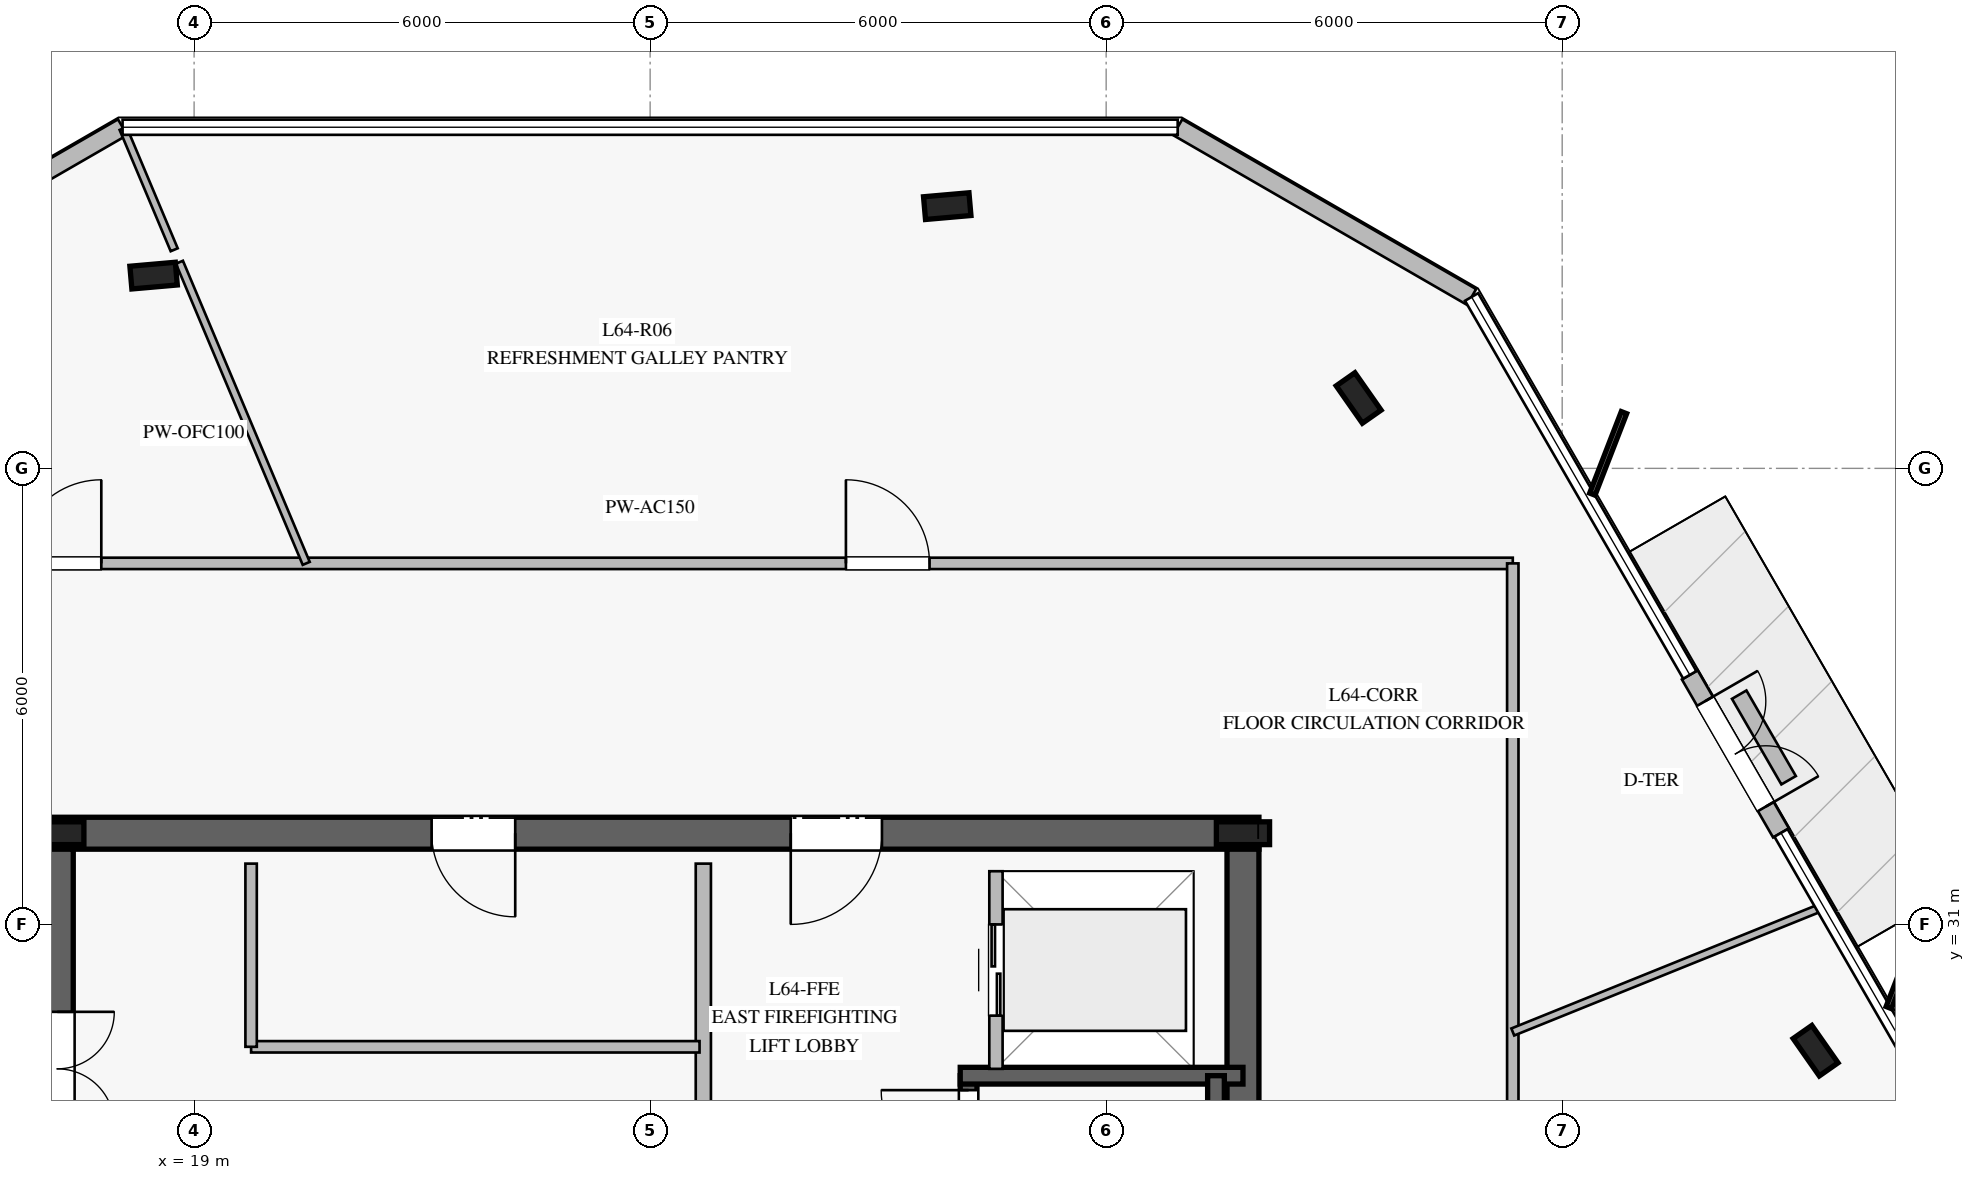
"""IFC4 building model, lengths in metres.
Left out: names, types, materials, properties, quantities, classifications, styles, units other than length and angle.
Written with IfcOpenShell. Run it as: python <this file> out.ifc"""

import sys

from ifc_helpers import new_model, si_unit, direction, frame, frame_2d, origin, origin_2d, place, context, subcontext, project, spatial, rectangle, i_section, extrude, element, fill, save


model = new_model("IFC4")
c1 = context("Model", 3, precision=1e-05, world=origin(), true_north=direction((0.0, 1.0)))
c2 = subcontext(c1, "Body", "Model", "MODEL_VIEW")
j1 = project(units=[si_unit("LENGTHUNIT", "METRE"), si_unit("PLANEANGLEUNIT", "RADIAN")], contexts=[c1])
p1 = place(None, origin())
s1 = spatial("IfcSite", under=j1, at=p1, CompositionType="ELEMENT")
p2 = place(p1, origin())
s2 = spatial("IfcBuilding", under=s1, at=p2, CompositionType="ELEMENT")
p3 = place(p2, frame((0.0, 0.0, 266.2)))
s3 = spatial("IfcBuildingStorey", under=s2, at=p3, CompositionType="ELEMENT", Elevation=266.2)
p4 = place(p3, frame((33.01, 32.2, 0.0), z_axis=(0.0, 0.0, 1.0), x_axis=(-1.0, 0.0, 0.0)))
e1 = element("IfcWall", 1, at=p4, inside=s3, PredefinedType="SHEAR", context=c2, shape_type="SweptSolid", body=[
    extrude(rectangle(XDim=16.02, YDim=0.42, at=frame_2d((8.01, 0.0))), origin(), (0.0, 0.0, 1.0), 3.78),
])
p5 = place(p4, frame((4.96, 0.0, 0.0)))
e2 = element("IfcOpeningElement", 2, at=p5, cuts=e1, PredefinedType="OPENING", context=c2, shape_type="SweptSolid", body=[
    extrude(rectangle(XDim=1.2, YDim=2.25, at=frame_2d((0.6, 1.125))), frame((0.0, 0.22, 0.0), z_axis=(0.0, -1.0, 0.0), x_axis=(1.0, 0.0, 0.0)), (0.0, 0.0, 1.0), 0.44),
])
p6 = place(p4, frame((9.785, 0.0, 0.0)))
e3 = element("IfcOpeningElement", 3, at=p6, cuts=e1, PredefinedType="OPENING", context=c2, shape_type="SweptSolid", body=[
    extrude(rectangle(XDim=1.1, YDim=2.2, at=frame_2d((0.55, 1.1))), frame((0.0, 0.22, 0.0), z_axis=(0.0, -1.0, 0.0), x_axis=(1.0, 0.0, 0.0)), (0.0, 0.0, 1.0), 0.44),
])
p7 = place(p3, frame((17.2, 31.99, 0.0), z_axis=(0.0, 0.0, 1.0), x_axis=(0.0, -1.0, 0.0)))
e4 = element("IfcWall", 4, at=p7, inside=s3, PredefinedType="SHEAR", context=c2, shape_type="SweptSolid", body=[
    extrude(rectangle(XDim=13.98, YDim=0.42, at=frame_2d((6.99, 0.0))), origin(), (0.0, 0.0, 1.0), 3.78),
])
p8 = place(p7, frame((2.14, 0.0, 0.0)))
e5 = element("IfcOpeningElement", 5, at=p8, cuts=e4, PredefinedType="OPENING", context=c2, shape_type="SweptSolid", body=[
    extrude(rectangle(XDim=1.5, YDim=2.2, at=frame_2d((0.75, 1.1))), frame((0.0, 0.22, 0.0), z_axis=(0.0, -1.0, 0.0), x_axis=(1.0, 0.0, 0.0)), (0.0, 0.0, 1.0), 0.44),
])
p9 = place(p3, frame((32.8, 18.01, 0.0), z_axis=(0.0, 0.0, 1.0), x_axis=(0.0, 1.0, 0.0)))
e6 = element("IfcWall", 6, at=p9, inside=s3, PredefinedType="SHEAR", context=c2, shape_type="SweptSolid", body=[
    extrude(rectangle(XDim=13.98, YDim=0.42, at=frame_2d((6.99, 0.0))), origin(), (0.0, 0.0, 1.0), 3.78),
])
for number, where, z_axis, x_axis in (
    (7, (32.8, 32.2, 0.0), (0.0, 0.0, 1.0), (1.0, 0.0, 0.0)),
    (8, (17.2, 32.2, 0.0), (0.0, 0.0, 1.0), (1.0, 0.0, 0.0)),
):
    element("IfcColumn", number, at=place(p3, frame(where, z_axis=z_axis, x_axis=x_axis)), inside=s3, PredefinedType="COLUMN", context=c2, shape_type="SweptSolid", body=[
        extrude(i_section(OverallWidth=0.3, OverallDepth=0.7, WebThickness=0.017, FlangeThickness=0.032, at=origin_2d()), origin(), (0.0, 0.0, 1.0), 4.0),
    ])
p10 = place(p3, frame((29.19, 21.79, 0.0), z_axis=(0.0, 0.0, 1.0), x_axis=(0.0, 1.0, 0.0)))
e9 = element("IfcWall", 9, at=p10, inside=s3, PredefinedType="SOLIDWALL", context=c2, shape_type="SweptSolid", body=[
    extrude(rectangle(XDim=7.22, YDim=0.22, at=frame_2d((3.61, 0.0))), origin(), (0.0, 0.0, 1.0), 3.78),
])
p11 = place(p10, frame((5.88, 0.0, 0.0)))
e10 = element("IfcOpeningElement", 10, at=p11, cuts=e9, PredefinedType="OPENING", context=c2, shape_type="SweptSolid", body=[
    extrude(rectangle(XDim=1.15, YDim=2.2, at=frame_2d((0.575, 1.1))), frame((0.0, 0.12, 0.0), z_axis=(0.0, -1.0, 0.0), x_axis=(1.0, 0.0, 0.0)), (0.0, 0.0, 1.0), 0.24),
])
p12 = place(p3, frame((29.08, 29.01, 0.0), z_axis=(0.0, 0.0, 1.0), x_axis=(1.0, 0.0, 0.0)))
e11 = element("IfcWall", 11, at=p12, inside=s3, PredefinedType="SOLIDWALL", context=c2, shape_type="SweptSolid", body=[
    extrude(rectangle(XDim=3.72, YDim=0.22, at=frame_2d((1.86, 0.0))), origin(), (0.0, 0.0, 1.0), 3.78),
])
p13 = place(p3, frame((32.445, 29.01, 0.0), z_axis=(0.0, 0.0, 1.0), x_axis=(0.0, -1.0, 0.0)))
e12 = element("IfcWall", 12, at=p13, inside=s3, PredefinedType="SOLIDWALL", context=c2, shape_type="SweptSolid", body=[
    extrude(rectangle(XDim=7.22, YDim=0.22, at=frame_2d((3.61, 0.0))), origin(), (0.0, 0.0, 1.0), 3.78),
])
for number, where, z_axis, x_axis in (
    (13, (28.909, 40.45, 0.0), (0.0, 0.0, 1.0), (0.996, 0.087, 0.0)),
    (14, (18.467, 39.536, 0.0), (0.0, 0.0, 1.0), (0.996, 0.087, 0.0)),
    (15, (40.334, 29.339, 0.0), (0.0, 0.0, 1.0), (-0.574, 0.819, 0.0)),
    (16, (34.322, 37.926, 0.0), (0.0, 0.0, 1.0), (-0.574, 0.819, 0.0)),
):
    element("IfcColumn", number, at=place(p3, frame(where, z_axis=z_axis, x_axis=x_axis)), inside=s3, PredefinedType="COLUMN", context=c2, shape_type="SweptSolid", body=[
        extrude(i_section(OverallWidth=0.3, OverallDepth=0.6, WebThickness=0.015, FlangeThickness=0.03, at=origin_2d()), origin(), (0.0, 0.0, 1.0), 4.0),
    ])
p14 = place(p3, frame((18.059, 41.488, 0.0), z_axis=(0.0, 0.0, 1.0), x_axis=(-0.865983458261, -0.500072644742, 0.0)))
e17 = element("IfcWall", 17, at=p14, inside=s3, PredefinedType="STANDARD", context=c2, shape_type="SweptSolid", body=[
    extrude(rectangle(XDim=4.466, YDim=0.24, at=frame_2d((2.233, 0.0))), origin(), (0.0, 0.0, 1.0), 3.78),
])
p15 = place(p3, frame((39.879, 32.204, 0.0), z_axis=(0.0, 0.0, 1.0), x_axis=(-0.499913221443, 0.866075499611, 0.0)))
e18 = element("IfcWall", 18, at=p15, inside=s3, PredefinedType="STANDARD", context=c2, shape_type="SweptSolid", body=[
    extrude(rectangle(XDim=2.4, YDim=0.24, at=frame_2d((1.2, 0.0))), origin(), (0.0, 0.0, 1.0), 3.78),
])
p16 = place(p15, frame((0.4, 0.0, 0.0)))
e19 = element("IfcOpeningElement", 19, at=p16, cuts=e18, PredefinedType="OPENING", context=c2, shape_type="SweptSolid", body=[
    extrude(rectangle(XDim=1.6, YDim=2.25, at=frame_2d((0.8, 1.125))), frame((0.0, 0.13, 0.0), z_axis=(0.0, -1.0, 0.0), x_axis=(1.0, 0.0, 0.0)), (0.0, 0.0, 1.0), 0.26),
])
p17 = place(p3, frame((35.808, 39.255, 0.0), z_axis=(0.0, 0.0, 1.0), x_axis=(-0.865983458261, 0.500072644742, 0.0)))
e20 = element("IfcWall", 20, at=p17, inside=s3, PredefinedType="STANDARD", context=c2, shape_type="SweptSolid", body=[
    extrude(rectangle(XDim=4.466, YDim=0.24, at=frame_2d((2.233, 0.0))), origin(), (0.0, 0.0, 1.0), 3.78),
])
p18 = place(p3, frame((39.979, 32.897, 0.0), z_axis=(0.0, 0.0, 1.0), x_axis=(-0.49989585183, 0.866085525409, 0.0)))
e21 = element("IfcWall", 21, at=p18, inside=s3, PredefinedType="USERDEFINED", context=c2, shape_type="SweptSolid", body=[
    extrude(rectangle(XDim=1.3, YDim=0.22, at=frame_2d((0.65, 0.0))), origin(), (0.0, 0.0, 1.0), 0.4),
])
p19 = place(p3, frame((25.7, 26.65, 0.0), z_axis=(0.0, 0.0, 1.0), x_axis=(0.0, 1.0, 0.0)))
e22 = element("IfcWall", 22, at=p19, inside=s3, PredefinedType="PARTITIONING", context=c2, shape_type="SweptSolid", body=[
    extrude(rectangle(XDim=5.15, YDim=0.2, at=frame_2d((2.575, 0.0))), origin(), (0.0, 0.0, 1.0), 3.78),
])
p20 = place(p3, frame((19.75, 29.39, 0.0), z_axis=(0.0, 0.0, 1.0), x_axis=(1.0, 0.0, 0.0)))
e23 = element("IfcWall", 23, at=p20, inside=s3, PredefinedType="PARTITIONING", context=c2, shape_type="SweptSolid", body=[
    extrude(rectangle(XDim=5.9, YDim=0.15, at=frame_2d((2.95, 0.0))), origin(), (0.0, 0.0, 1.0), 3.78),
])
p21 = place(p3, frame((19.75, 29.39, 0.0), z_axis=(0.0, 0.0, 1.0), x_axis=(0.0, 1.0, 0.0)))
e24 = element("IfcWall", 24, at=p21, inside=s3, PredefinedType="PARTITIONING", context=c2, shape_type="SweptSolid", body=[
    extrude(rectangle(XDim=2.41, YDim=0.15, at=frame_2d((1.205, 0.0))), origin(), (0.0, 0.0, 1.0), 3.78),
])
p22 = place(p3, frame((29.55, 29.1, 0.0), z_axis=(0.0, 0.0, 1.0), x_axis=(0.0, 1.0, 0.0)))
e25 = element("IfcWall", 25, at=p22, inside=s3, PredefinedType="PARTITIONING", context=c2, shape_type="SweptSolid", body=[
    extrude(rectangle(XDim=2.6, YDim=0.175, at=frame_2d((1.3, 0.0))), origin(), (0.0, 0.0, 1.0), 3.78),
])
p23 = place(p22, frame((0.7, 0.0, 0.0)))
e26 = element("IfcOpeningElement", 26, at=p23, cuts=e25, PredefinedType="OPENING", context=c2, shape_type="SweptSolid", body=[
    extrude(rectangle(XDim=1.2, YDim=2.2, at=frame_2d((0.6, 1.1))), frame((0.0, 0.098, 0.0), z_axis=(0.0, -1.0, 0.0), x_axis=(1.0, 0.0, 0.0)), (0.0, 0.0, 1.0), 0.195),
])
p24 = place(p3, frame((13.65, 35.75, 0.0), z_axis=(0.0, 0.0, 1.0), x_axis=(1.0, 0.0, 0.0)))
e27 = element("IfcWall", 27, at=p24, inside=s3, PredefinedType="PARTITIONING", context=c2, shape_type="SweptSolid", body=[
    extrude(rectangle(XDim=22.7, YDim=0.15, at=frame_2d((11.35, 0.0))), origin(), (0.0, 0.0, 1.0), 3.05),
])
p25 = place(p24, frame((13.926, 0.0, 0.0)))
e28 = element("IfcOpeningElement", 28, at=p25, cuts=e27, PredefinedType="OPENING", context=c2, shape_type="SweptSolid", body=[
    extrude(rectangle(XDim=1.1, YDim=2.2, at=frame_2d((0.55, 1.1))), frame((0.0, 0.085, 0.0), z_axis=(0.0, -1.0, 0.0), x_axis=(1.0, 0.0, 0.0)), (0.0, 0.0, 1.0), 0.17),
])
p26 = place(p24, frame((3.029, 0.0, 0.0)))
e29 = element("IfcOpeningElement", 29, at=p26, cuts=e27, PredefinedType="OPENING", context=c2, shape_type="SweptSolid", body=[
    extrude(rectangle(XDim=1.1, YDim=2.2, at=frame_2d((0.55, 1.1))), frame((0.0, 0.085, 0.0), z_axis=(0.0, -1.0, 0.0), x_axis=(1.0, 0.0, 0.0)), (0.0, 0.0, 1.0), 0.17),
])
p27 = place(p3, frame((36.35, 35.75, 0.0), z_axis=(0.0, 0.0, 1.0), x_axis=(0.0, -1.0, 0.0)))
e30 = element("IfcWall", 30, at=p27, inside=s3, PredefinedType="PARTITIONING", context=c2, shape_type="SweptSolid", body=[
    extrude(rectangle(XDim=21.5, YDim=0.15, at=frame_2d((10.75, 0.0))), origin(), (0.0, 0.0, 1.0), 2.43),
])
p28 = place(p27, frame((17.787, 0.0, 0.0)))
e31 = element("IfcOpeningElement", 31, at=p28, cuts=e30, PredefinedType="OPENING", context=c2, shape_type="SweptSolid", body=[
    extrude(rectangle(XDim=1.1, YDim=2.2, at=frame_2d((0.55, 1.1))), frame((0.0, 0.085, 0.0), z_axis=(0.0, -1.0, 0.0), x_axis=(1.0, 0.0, 0.0)), (0.0, 0.0, 1.0), 0.17),
])
p29 = place(p27, frame((10.2, 0.0, 0.0)))
e32 = element("IfcOpeningElement", 32, at=p29, cuts=e30, PredefinedType="OPENING", context=c2, shape_type="SweptSolid", body=[
    extrude(rectangle(XDim=1.1, YDim=2.2, at=frame_2d((0.55, 1.1))), frame((0.0, 0.085, 0.0), z_axis=(0.0, -1.0, 0.0), x_axis=(1.0, 0.0, 0.0)), (0.0, 0.0, 1.0), 0.17),
])
p30 = place(p3, frame((20.475, 35.75, 0.0), z_axis=(0.0, 0.0, 1.0), x_axis=(-0.38806461695, 0.921632167989, 0.0)))
e33 = element("IfcWall", 33, at=p30, inside=s3, PredefinedType="MOVABLE", context=c2, shape_type="SweptSolid", body=[
    extrude(rectangle(XDim=4.299, YDim=0.1, at=frame_2d((2.149, 0.0))), origin(), (0.0, 0.0, 1.0), 3.28),
])
p31 = place(p3, frame((18.738, 39.876, 0.0), z_axis=(0.0, 0.0, 1.0), x_axis=(-0.388126329447, 0.921606180746, 0.0)))
e34 = element("IfcWall", 34, at=p31, inside=s3, PredefinedType="MOVABLE", context=c2, shape_type="SweptSolid", body=[
    extrude(rectangle(XDim=1.732, YDim=0.1, at=frame_2d((0.866, 0.0))), origin(), (0.0, 0.0, 1.0), 3.78),
])
p32 = place(p3, frame((36.35, 29.585, 0.0), z_axis=(0.0, 0.0, 1.0), x_axis=(0.927229589725, 0.374493375026, 0.0)))
e35 = element("IfcWall", 35, at=p32, inside=s3, PredefinedType="MOVABLE", context=c2, shape_type="SweptSolid", body=[
    extrude(rectangle(XDim=4.393, YDim=0.1, at=frame_2d((2.196, 0.0))), origin(), (0.0, 0.0, 1.0), 3.28),
])
p33 = place(p16, frame((1.6, 0.0, 0.0), z_axis=(0.0, 0.0, 1.0), x_axis=(-1.0, 0.0, 0.0)))
e36 = element("IfcDoor", 36, at=p33, inside=s3, OperationType="DOUBLE_DOOR_SINGLE_SWING", PredefinedType="DOOR", context=c2, shape_type="SweptSolid", body=[
    extrude(rectangle(XDim=1.6, YDim=2.25, at=frame_2d((0.8, 1.125))), frame((0.0, 0.025, 0.0), z_axis=(0.0, -1.0, 0.0), x_axis=(1.0, 0.0, 0.0)), (0.0, 0.0, 1.0), 0.05),
])
fill(e19, e36)
p34 = place(p11, origin())
e37 = element("IfcDoor", 37, at=p34, inside=s3, OperationType="SINGLE_SWING_RIGHT", PredefinedType="DOOR", context=c2, shape_type="SweptSolid", body=[
    extrude(rectangle(XDim=1.15, YDim=2.2, at=frame_2d((0.575, 1.1))), frame((0.0, 0.025, 0.0), z_axis=(0.0, -1.0, 0.0), x_axis=(1.0, 0.0, 0.0)), (0.0, 0.0, 1.0), 0.05),
])
fill(e10, e37)
p35 = place(p5, origin())
e38 = element("IfcDoor", 38, at=p35, inside=s3, OperationType="SINGLE_SWING_RIGHT", PredefinedType="DOOR", context=c2, shape_type="SweptSolid", body=[
    extrude(rectangle(XDim=1.2, YDim=2.25, at=frame_2d((0.6, 1.125))), frame((0.0, 0.025, 0.0), z_axis=(0.0, -1.0, 0.0), x_axis=(1.0, 0.0, 0.0)), (0.0, 0.0, 1.0), 0.05),
])
fill(e2, e38)
p36 = place(p8, origin())
e39 = element("IfcDoor", 39, at=p36, inside=s3, OperationType="DOUBLE_DOOR_SINGLE_SWING", PredefinedType="DOOR", context=c2, shape_type="SweptSolid", body=[
    extrude(rectangle(XDim=1.5, YDim=2.2, at=frame_2d((0.75, 1.1))), frame((0.0, 0.025, 0.0), z_axis=(0.0, -1.0, 0.0), x_axis=(1.0, 0.0, 0.0)), (0.0, 0.0, 1.0), 0.05),
])
fill(e5, e39)
p37 = place(p6, origin())
e40 = element("IfcDoor", 40, at=p37, inside=s3, OperationType="SINGLE_SWING_LEFT", PredefinedType="DOOR", context=c2, shape_type="SweptSolid", body=[
    extrude(rectangle(XDim=1.1, YDim=2.2, at=frame_2d((0.55, 1.1))), frame((0.0, 0.025, 0.0), z_axis=(0.0, -1.0, 0.0), x_axis=(1.0, 0.0, 0.0)), (0.0, 0.0, 1.0), 0.05),
])
fill(e3, e40)
p38 = place(p23, origin())
e41 = element("IfcDoor", 41, at=p38, inside=s3, OperationType="DOUBLE_DOOR_SLIDING", PredefinedType="DOOR", context=c2, shape_type="SweptSolid", body=[
    extrude(rectangle(XDim=1.2, YDim=2.2, at=frame_2d((0.6, 1.1))), frame((0.0, 0.025, 0.0), z_axis=(0.0, -1.0, 0.0), x_axis=(1.0, 0.0, 0.0)), (0.0, 0.0, 1.0), 0.05),
])
fill(e26, e41)
p39 = place(p25, origin())
e42 = element("IfcDoor", 42, at=p39, inside=s3, OperationType="SINGLE_SWING_LEFT", PredefinedType="DOOR", context=c2, shape_type="SweptSolid", body=[
    extrude(rectangle(XDim=1.1, YDim=2.2, at=frame_2d((0.55, 1.1))), frame((0.0, 0.025, 0.0), z_axis=(0.0, -1.0, 0.0), x_axis=(1.0, 0.0, 0.0)), (0.0, 0.0, 1.0), 0.05),
])
fill(e28, e42)
p40 = place(p26, origin())
e43 = element("IfcDoor", 43, at=p40, inside=s3, OperationType="SINGLE_SWING_RIGHT", PredefinedType="DOOR", context=c2, shape_type="SweptSolid", body=[
    extrude(rectangle(XDim=1.1, YDim=2.2, at=frame_2d((0.55, 1.1))), frame((0.0, 0.025, 0.0), z_axis=(0.0, -1.0, 0.0), x_axis=(1.0, 0.0, 0.0)), (0.0, 0.0, 1.0), 0.05),
])
fill(e29, e43)
save(model, sys.argv[1])
